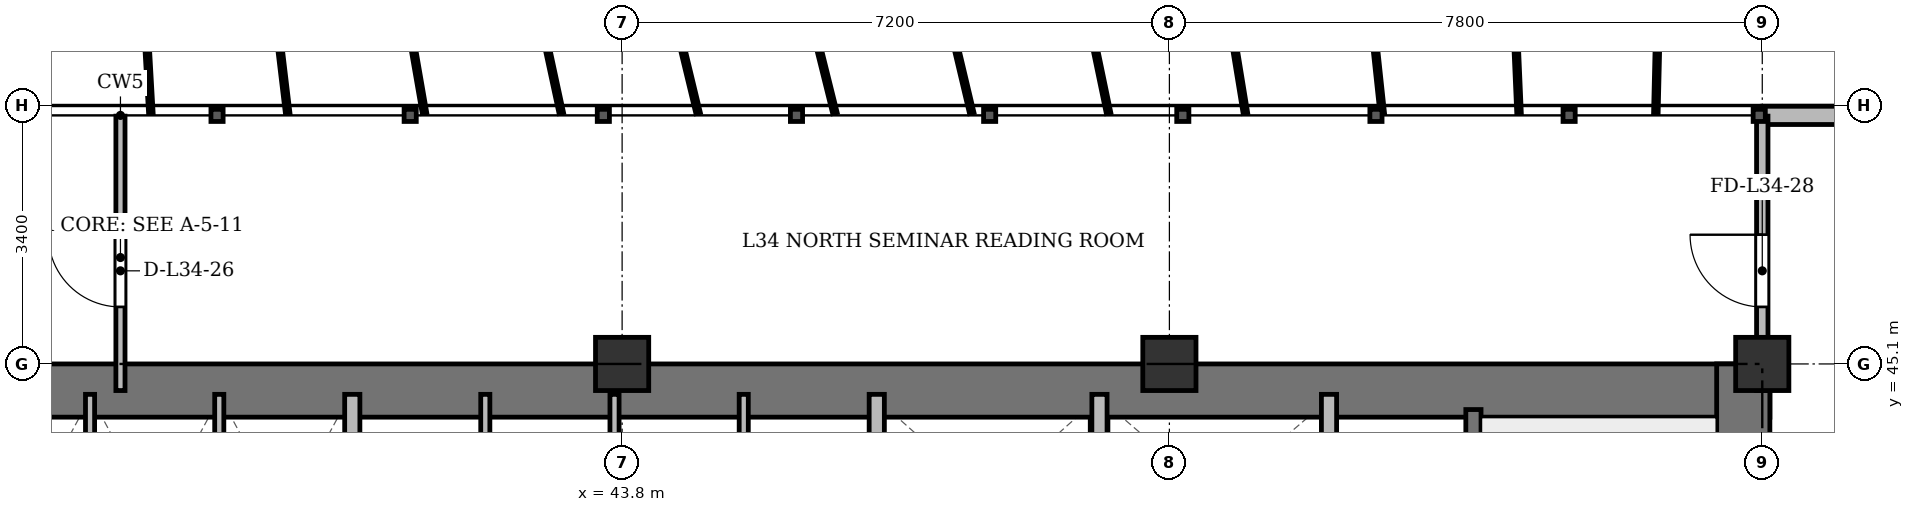
"""IFC4 building model, lengths in metres.
Left out: names, types, materials, properties, quantities, classifications, styles, units other than length and angle.
Written with IfcOpenShell. Run it as: python <this file> out.ifc"""

import sys

from ifc_helpers import new_model, si_unit, direction, frame, frame_2d, origin, origin_2d, place, context, subcontext, project, spatial, rectangle, extrude, source, transform, mapped, element, fill, save


model = new_model("IFC4")
c1 = context("Model", 3, precision=1e-05, world=origin(), true_north=direction((0.0, 1.0)))
c2 = subcontext(c1, "Body", "Model", "MODEL_VIEW")
j1 = project(units=[si_unit("LENGTHUNIT", "METRE"), si_unit("PLANEANGLEUNIT", "RADIAN")], contexts=[c1])
p1 = place(None, origin())
s1 = spatial("IfcSite", under=j1, at=p1, CompositionType="ELEMENT")
p2 = place(p1, origin())
s2 = spatial("IfcBuilding", under=s1, at=p2, CompositionType="ELEMENT")
p3 = place(p2, frame((0.0, 0.0, 132.1)))
s3 = spatial("IfcBuildingStorey", under=s2, at=p3, CompositionType="ELEMENT", Elevation=132.1)
m1 = source(origin(), c2, "Body", "SweptSolid", [
    extrude(rectangle(XDim=0.7, YDim=0.7, at=origin_2d()), origin(), (0.0, 0.0, 1.0), 3.6),
])
for number, where, z_axis, x_axis in (
    (1, (43.8, 45.1, 0.0), (0.0, 0.0, 1.0), (1.0, 0.0, 0.0)),
    (2, (51.0, 45.1, 0.0), (0.0, 0.0, 1.0), (1.0, 0.0, 0.0)),
    (3, (58.8, 45.1, 0.0), (0.0, 0.0, 1.0), (1.0, 0.0, 0.0)),
):
    element("IfcColumn", number, at=place(p3, frame(where, z_axis=z_axis, x_axis=x_axis)), inside=s3, PredefinedType="COLUMN", context=c2, shape_type="MappedRepresentation", body=[
        mapped(m1, transform((0.0, 0.0, 0.0), x_axis=(1.0, 0.0, 0.0), y_axis=(0.0, 1.0, 0.0), z_axis=(0.0, 0.0, 1.0), scale=1.0)),
    ])
p4 = place(p3, frame((58.8, 48.37, 0.0), z_axis=(0.0, 0.0, 1.0), x_axis=(1.0, 0.0, 0.0)))
e4 = element("IfcWall", 4, at=p4, inside=s3, PredefinedType="SOLIDWALL", context=c2, shape_type="SweptSolid", body=[
    extrude(rectangle(XDim=4.7, YDim=0.24, at=frame_2d((2.35, 0.0))), origin(), (0.0, 0.0, 1.0), 3.35),
])
p5 = place(p4, frame((1.368, 0.0, 0.9)))
e5 = element("IfcOpeningElement", 5, at=p5, cuts=e4, PredefinedType="OPENING", context=c2, shape_type="SweptSolid", body=[
    extrude(rectangle(XDim=1.2, YDim=1.65, at=frame_2d((0.6, 0.825))), frame((0.0, 0.13, 0.0), z_axis=(0.0, -1.0, 0.0), x_axis=(1.0, 0.0, 0.0)), (0.0, 0.0, 1.0), 0.26),
])
p6 = place(p3, frame((15.5, 44.75, 0.0), z_axis=(0.0, 0.0, 1.0), x_axis=(1.0, 0.0, 0.0)))
e6 = element("IfcWall", 6, at=p6, inside=s3, PredefinedType="SHEAR", context=c2, shape_type="SweptSolid", body=[
    extrude(rectangle(XDim=43.4, YDim=0.7, at=frame_2d((21.7, 0.0))), origin(), (0.0, 0.0, 1.0), 3.35),
])
p7 = place(p3, frame((58.55, 33.4, 0.0), z_axis=(0.0, 0.0, 1.0), x_axis=(0.0, 1.0, 0.0)))
e7 = element("IfcWall", 7, at=p7, inside=s3, PredefinedType="SHEAR", context=c2, shape_type="SweptSolid", body=[
    extrude(rectangle(XDim=11.7, YDim=0.7, at=frame_2d((5.85, 0.0))), origin(), (0.0, 0.0, 1.0), 3.35),
])
p8 = place(p3, frame((55.0, 33.4, 0.0), z_axis=(0.0, 0.0, 1.0), x_axis=(0.0, 1.0, 0.0)))
e8 = element("IfcWall", 8, at=p8, inside=s3, PredefinedType="SHEAR", context=c2, shape_type="SweptSolid", body=[
    extrude(rectangle(XDim=11.1, YDim=0.2, at=frame_2d((5.55, 0.0))), origin(), (0.0, 0.0, 1.0), 3.35),
])
p9 = place(p8, frame((0.85, 0.0, 0.0)))
e9 = element("IfcOpeningElement", 9, at=p9, cuts=e8, PredefinedType="OPENING", context=c2, shape_type="SweptSolid", body=[
    extrude(rectangle(XDim=1.1, YDim=2.15, at=frame_2d((0.55, 1.075))), frame((0.0, 0.11, 0.0), z_axis=(0.0, -1.0, 0.0), x_axis=(1.0, 0.0, 0.0)), (0.0, 0.0, 1.0), 0.22),
])
for number, where, z_axis, x_axis in (
    (10, (36.8, 41.5, 0.0), (0.0, 0.0, 1.0), (0.0, 1.0, 0.0)),
    (11, (38.5, 41.5, 0.0), (0.0, 0.0, 1.0), (0.0, 1.0, 0.0)),
):
    element("IfcWall", number, at=place(p3, frame(where, z_axis=z_axis, x_axis=x_axis)), inside=s3, PredefinedType="PARTITIONING", context=c2, shape_type="SweptSolid", body=[
        extrude(rectangle(XDim=3.2, YDim=0.12, at=frame_2d((1.6, 0.0))), origin(), (0.0, 0.0, 1.0), 3.35),
    ])
p10 = place(p3, frame((40.25, 41.5, 0.0), z_axis=(0.0, 0.0, 1.0), x_axis=(0.0, 1.0, 0.0)))
e12 = element("IfcWall", 12, at=p10, inside=s3, PredefinedType="SOLIDWALL", context=c2, shape_type="SweptSolid", body=[
    extrude(rectangle(XDim=3.2, YDim=0.2, at=frame_2d((1.6, 0.0))), origin(), (0.0, 0.0, 1.0), 3.35),
])
p11 = place(p3, frame((42.0, 41.5, 0.0), z_axis=(0.0, 0.0, 1.0), x_axis=(0.0, 1.0, 0.0)))
e13 = element("IfcWall", 13, at=p11, inside=s3, PredefinedType="PARTITIONING", context=c2, shape_type="SweptSolid", body=[
    extrude(rectangle(XDim=3.2, YDim=0.12, at=frame_2d((1.6, 0.0))), origin(), (0.0, 0.0, 1.0), 3.35),
])
p12 = place(p3, frame((43.7, 41.5, 0.0), z_axis=(0.0, 0.0, 1.0), x_axis=(0.0, 1.0, 0.0)))
e14 = element("IfcWall", 14, at=p12, inside=s3, PredefinedType="PARTITIONING", context=c2, shape_type="SweptSolid", body=[
    extrude(rectangle(XDim=3.2, YDim=0.12, at=frame_2d((1.6, 0.0))), origin(), (0.0, 0.0, 1.0), 2.85),
])
p13 = place(p3, frame((45.4, 41.5, 0.0), z_axis=(0.0, 0.0, 1.0), x_axis=(0.0, 1.0, 0.0)))
e15 = element("IfcWall", 15, at=p13, inside=s3, PredefinedType="PARTITIONING", context=c2, shape_type="SweptSolid", body=[
    extrude(rectangle(XDim=3.2, YDim=0.12, at=frame_2d((1.6, 0.0))), origin(), (0.0, 0.0, 1.0), 3.35),
])
p14 = place(p3, frame((47.15, 33.4, 0.0), z_axis=(0.0, 0.0, 1.0), x_axis=(0.0, 1.0, 0.0)))
e16 = element("IfcWall", 16, at=p14, inside=s3, PredefinedType="SOLIDWALL", context=c2, shape_type="SweptSolid", body=[
    extrude(rectangle(XDim=11.3, YDim=0.2, at=frame_2d((5.65, 0.0))), origin(), (0.0, 0.0, 1.0), 2.75),
])
for number, where, z_axis, x_axis in (
    (17, (50.08, 42.05, 0.0), (0.0, 0.0, 1.0), (0.0, 1.0, 0.0)),
    (18, (53.1, 42.05, 0.0), (0.0, 0.0, 1.0), (0.0, 1.0, 0.0)),
):
    element("IfcWall", number, at=place(p3, frame(where, z_axis=z_axis, x_axis=x_axis)), inside=s3, PredefinedType="SOLIDWALL", context=c2, shape_type="SweptSolid", body=[
        extrude(rectangle(XDim=2.65, YDim=0.2, at=frame_2d((1.325, 0.0))), origin(), (0.0, 0.0, 1.0), 3.35),
    ])
p15 = place(p3, frame((37.2, 44.75, 0.0), z_axis=(0.0, 0.0, 1.0), x_axis=(0.0, 1.0, 0.0)))
e19 = element("IfcWall", 19, at=p15, inside=s3, PredefinedType="PARTITIONING", context=c2, shape_type="SweptSolid", body=[
    extrude(rectangle(XDim=3.61, YDim=0.12, at=frame_2d((1.805, 0.0))), origin(), (0.0, 0.0, 1.0), 2.75),
])
p16 = place(p15, frame((1.1, 0.0, 0.0)))
e20 = element("IfcOpeningElement", 20, at=p16, cuts=e19, PredefinedType="OPENING", context=c2, shape_type="SweptSolid", body=[
    extrude(rectangle(XDim=0.95, YDim=2.15, at=frame_2d((0.475, 1.075))), frame((0.0, 0.07, 0.0), z_axis=(0.0, -1.0, 0.0), x_axis=(1.0, 0.0, 0.0)), (0.0, 0.0, 1.0), 0.14),
])
p17 = place(p3, frame((58.8, 44.75, 0.0), z_axis=(0.0, 0.0, 1.0), x_axis=(0.0, 1.0, 0.0)))
e21 = element("IfcWall", 21, at=p17, inside=s3, PredefinedType="PARTITIONING", context=c2, shape_type="SweptSolid", body=[
    extrude(rectangle(XDim=3.61, YDim=0.15, at=frame_2d((1.805, 0.0))), origin(), (0.0, 0.0, 1.0), 2.85),
])
p18 = place(p17, frame((1.1, 0.0, 0.0)))
e22 = element("IfcOpeningElement", 22, at=p18, cuts=e21, PredefinedType="OPENING", context=c2, shape_type="SweptSolid", body=[
    extrude(rectangle(XDim=0.95, YDim=2.15, at=frame_2d((0.475, 1.075))), frame((0.0, 0.085, 0.0), z_axis=(0.0, -1.0, 0.0), x_axis=(1.0, 0.0, 0.0)), (0.0, 0.0, 1.0), 0.17),
])
m2 = source(origin(), c2, "Body", "SweptSolid", [
    extrude(rectangle(XDim=0.95, YDim=2.15, at=frame_2d((0.475, 1.075))), frame((0.0, 0.025, 0.0), z_axis=(0.0, -1.0, 0.0), x_axis=(1.0, 0.0, 0.0)), (0.0, 0.0, 1.0), 0.05),
])
p19 = place(p16, origin())
e23 = element("IfcDoor", 23, at=p19, inside=s3, OperationType="SINGLE_SWING_RIGHT", PredefinedType="DOOR", context=c2, shape_type="MappedRepresentation", body=[
    mapped(m2, transform((0.0, 0.0, 0.0), x_axis=(1.0, 0.0, 0.0), y_axis=(0.0, 1.0, 0.0), z_axis=(0.0, 0.0, 1.0), scale=1.0)),
])
fill(e20, e23)
p20 = place(p18, origin())
e24 = element("IfcDoor", 24, at=p20, inside=s3, OperationType="SINGLE_SWING_RIGHT", PredefinedType="DOOR", context=c2, shape_type="MappedRepresentation", body=[
    mapped(m2, transform((0.0, 0.0, 0.0), x_axis=(1.0, 0.0, 0.0), y_axis=(0.0, 1.0, 0.0), z_axis=(0.0, 0.0, 1.0), scale=1.0)),
])
fill(e22, e24)
save(model, sys.argv[1])
